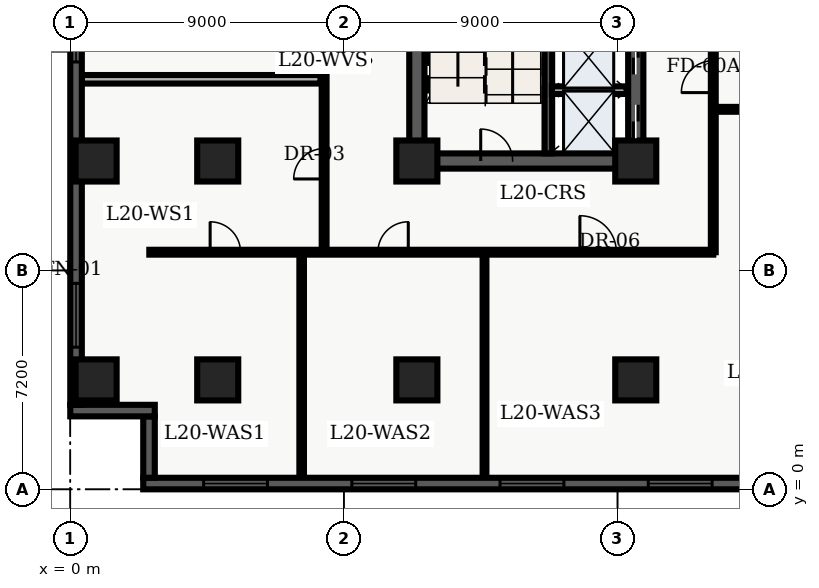
"""IFC4 building model, lengths in metres.
Left out: names, types, materials, properties, quantities, classifications, styles, units other than length and angle.
Written with IfcOpenShell. Run it as: python <this file> out.ifc"""

import sys

from ifc_helpers import new_model, entity, si_unit, converted_unit, direction, frame, origin_with_axes, origin_2d_with_axis, place, context, subcontext, project, spatial, polyline, rectangle, outline, extrude, element, fill, save


model = new_model("IFC4")
c1 = context("Model", 3, precision=1e-05, world=origin_with_axes(), true_north=direction((0.0, 1.0)))
c2 = subcontext(c1, "Body", "Model", "MODEL_VIEW")
j1 = project(units=[si_unit("LENGTHUNIT", "METRE"), converted_unit("PLANEANGLEUNIT", "DEGREE", entity("IfcPlaneAngleMeasure", 0.017), si_unit("PLANEANGLEUNIT", "RADIAN"), dimensions=[0, 0, 0, 0, 0, 0, 0])], contexts=[c1])
p1 = place(None, origin_with_axes())
s1 = spatial("IfcSite", under=j1, at=p1, CompositionType="ELEMENT")
p2 = place(p1, origin_with_axes())
s2 = spatial("IfcBuilding", under=s1, at=p2, CompositionType="ELEMENT")
p3 = place(p2, frame((0.0, 0.0, 84.6), z_axis=(0.0, 0.0, 1.0), x_axis=(1.0, 0.0, 0.0)))
s3 = spatial("IfcBuildingStorey", under=s2, at=p3, CompositionType="ELEMENT", Elevation=84.6)
p4 = place(p3, frame((11.4, 10.8, 0.0), z_axis=(0.0, 0.0, 1.0), x_axis=(0.0, 1.0, 0.0)))
e1 = element("IfcWall", 1, at=p4, inside=s3, PredefinedType="SHEAR", context=c2, shape_type="SweptSolid", body=[
    extrude(outline(polyline([(0.0, -0.25), (27.0, -0.25), (27.0, 0.25), (0.0, 0.25), (0.0, -0.25)])), origin_with_axes(), (0.0, 0.0, 1.0), 4.26),
])
p5 = place(p3, frame((11.4, 10.8, 0.0), z_axis=(0.0, 0.0, 1.0), x_axis=(1.0, 0.0, 0.0)))
e2 = element("IfcWall", 2, at=p5, inside=s3, PredefinedType="SHEAR", context=c2, shape_type="SweptSolid", body=[
    extrude(outline(polyline([(0.0, -0.25), (7.2, -0.25), (7.2, 0.25), (0.0, 0.25), (0.0, -0.25)])), origin_with_axes(), (0.0, 0.0, 1.0), 4.26),
])
p6 = place(p5, frame((2.625, 0.0, 0.0), z_axis=(0.0, 0.0, 1.0), x_axis=(1.0, 0.0, 0.0)))
e3 = element("IfcOpeningElement", 3, at=p6, cuts=e2, PredefinedType="OPENING", context=c2, shape_type="SweptSolid", body=[
    extrude(rectangle(XDim=1.05, YDim=0.52, at=origin_2d_with_axis()), origin_with_axes(), (0.0, 0.0, 1.0), 2.15),
])
p7 = place(p3, frame((18.6, 10.8, 0.0), z_axis=(0.0, 0.0, 1.0), x_axis=(0.0, 1.0, 0.0)))
e4 = element("IfcWall", 4, at=p7, inside=s3, PredefinedType="SHEAR", context=c2, shape_type="SweptSolid", body=[
    extrude(outline(polyline([(0.0, -0.25), (13.5, -0.25), (13.5, 0.25), (0.0, 0.25), (0.0, -0.25)])), origin_with_axes(), (0.0, 0.0, 1.0), 4.26),
])
p8 = place(p7, frame((1.3, 0.0, 0.0), z_axis=(0.0, 0.0, 1.0), x_axis=(1.0, 0.0, 0.0)))
e5 = element("IfcOpeningElement", 5, at=p8, cuts=e4, PredefinedType="OPENING", context=c2, shape_type="SweptSolid", body=[
    extrude(rectangle(XDim=1.1, YDim=0.52, at=origin_2d_with_axis()), origin_with_axes(), (0.0, 0.0, 1.0), 2.15),
])
p9 = place(p7, frame((3.4, 0.0, 0.0), z_axis=(0.0, 0.0, 1.0), x_axis=(1.0, 0.0, 0.0)))
e6 = element("IfcOpeningElement", 6, at=p9, cuts=e4, PredefinedType="OPENING", context=c2, shape_type="SweptSolid", body=[
    extrude(rectangle(XDim=1.1, YDim=0.52, at=origin_2d_with_axis()), origin_with_axes(), (0.0, 0.0, 1.0), 2.15),
])
p10 = place(p7, frame((11.125, 0.0, 0.0), z_axis=(0.0, 0.0, 1.0), x_axis=(1.0, 0.0, 0.0)))
e7 = element("IfcOpeningElement", 7, at=p10, cuts=e4, PredefinedType="OPENING", context=c2, shape_type="SweptSolid", body=[
    extrude(rectangle(XDim=1.05, YDim=0.52, at=origin_2d_with_axis()), origin_with_axes(), (0.0, 0.0, 1.0), 2.15),
])
p11 = place(p3, frame((15.725, 11.05, 0.0), z_axis=(0.0, 0.0, 1.0), x_axis=(0.0, 1.0, 0.0)))
e8 = element("IfcWall", 8, at=p11, inside=s3, PredefinedType="SHEAR", context=c2, shape_type="SweptSolid", body=[
    extrude(outline(polyline([(0.0, -0.125), (8.65, -0.125), (8.65, 0.125), (0.0, 0.125), (0.0, -0.125)])), origin_with_axes(), (0.0, 0.0, 1.0), 4.26),
])
for number, where, z_axis, x_axis in (
    (9, (11.4, 3.6, 0.0), (0.0, 0.0, 1.0), (1.0, 0.0, 0.0)),
    (10, (11.4, 10.8, 0.0), (0.0, 0.0, 1.0), (1.0, 0.0, 0.0)),
    (11, (18.6, 3.6, 0.0), (0.0, 0.0, 1.0), (1.0, 0.0, 0.0)),
    (12, (18.6, 10.8, 0.0), (0.0, 0.0, 1.0), (1.0, 0.0, 0.0)),
    (13, (4.85, 3.6, 0.0), (0.0, 0.0, 1.0), (1.0, 0.0, 0.0)),
    (14, (4.85, 10.8, 0.0), (0.0, 0.0, 1.0), (1.0, 0.0, 0.0)),
    (15, (0.85, 3.6, 0.0), (0.0, 0.0, 1.0), (1.0, 0.0, 0.0)),
    (16, (0.85, 10.8, 0.0), (0.0, 0.0, 1.0), (1.0, 0.0, 0.0)),
):
    element("IfcColumn", number, at=place(p3, frame(where, z_axis=z_axis, x_axis=x_axis)), inside=s3, PredefinedType="COLUMN", context=c2, shape_type="SweptSolid", body=[
        extrude(rectangle(XDim=1.35, YDim=1.35, at=origin_2d_with_axis()), origin_with_axes(), (0.0, 0.0, 1.0), 4.5),
    ])
p12 = place(p3, frame((15.84, 13.13, 0.0), z_axis=(0.0, 0.0, 1.0), x_axis=(1.0, 0.0, 0.0)))
e17 = element("IfcWall", 17, at=p12, inside=s3, PredefinedType="SOLIDWALL", context=c2, shape_type="SweptSolid", body=[
    extrude(outline(polyline([(0.0, -0.125), (2.46, -0.125), (2.46, 0.125), (0.0, 0.125), (0.0, -0.125)])), origin_with_axes(), (0.0, 0.0, 1.0), 3.2),
])
p13 = place(p3, frame((2.6, 7.8, 0.0), z_axis=(0.0, 0.0, 1.0), x_axis=(1.0, 0.0, 0.0)))
e18 = element("IfcWall", 18, at=p13, inside=s3, PredefinedType="PARTITIONING", context=c2, shape_type="SweptSolid", body=[
    extrude(outline(polyline([(0.0, -0.08), (18.55, -0.08), (18.55, 0.08), (0.0, 0.08), (0.0, -0.08)])), origin_with_axes(), (0.0, 0.0, 1.0), 3.2),
])
p14 = place(p13, frame((2.501, 0.0, 0.0), z_axis=(0.0, 0.0, 1.0), x_axis=(1.0, 0.0, 0.0)))
e19 = element("IfcOpeningElement", 19, at=p14, cuts=e18, PredefinedType="OPENING", context=c2, shape_type="SweptSolid", body=[
    extrude(rectangle(XDim=1.0, YDim=0.18, at=origin_2d_with_axis()), origin_with_axes(), (0.0, 0.0, 1.0), 2.15),
])
p15 = place(p13, frame((8.018, 0.0, 0.0), z_axis=(0.0, 0.0, 1.0), x_axis=(1.0, 0.0, 0.0)))
e20 = element("IfcOpeningElement", 20, at=p15, cuts=e18, PredefinedType="OPENING", context=c2, shape_type="SweptSolid", body=[
    extrude(rectangle(XDim=1.0, YDim=0.18, at=origin_2d_with_axis()), origin_with_axes(), (0.0, 0.0, 1.0), 2.15),
])
p16 = place(p13, frame((14.762, 0.0, 0.0), z_axis=(0.0, 0.0, 1.0), x_axis=(1.0, 0.0, 0.0)))
e21 = element("IfcOpeningElement", 21, at=p16, cuts=e18, PredefinedType="OPENING", context=c2, shape_type="SweptSolid", body=[
    extrude(rectangle(XDim=1.2, YDim=0.18, at=origin_2d_with_axis()), origin_with_axes(), (0.0, 0.0, 1.0), 2.2),
])
p17 = place(p3, frame((21.15, 7.8, 0.0), z_axis=(0.0, 0.0, 1.0), x_axis=(0.0, 1.0, 0.0)))
e22 = element("IfcWall", 22, at=p17, inside=s3, PredefinedType="PARTITIONING", context=c2, shape_type="SweptSolid", body=[
    extrude(outline(polyline([(0.0, -0.08), (32.7, -0.08), (32.7, 0.08), (0.0, 0.08), (0.0, -0.08)])), origin_with_axes(), (0.0, 0.0, 1.0), 3.2),
])
p18 = place(p17, frame((5.775, 0.0, 0.0), z_axis=(0.0, 0.0, 1.0), x_axis=(1.0, 0.0, 0.0)))
e23 = element("IfcOpeningElement", 23, at=p18, cuts=e22, PredefinedType="OPENING", context=c2, shape_type="SweptSolid", body=[
    extrude(rectangle(XDim=1.05, YDim=0.18, at=origin_2d_with_axis()), origin_with_axes(), (0.0, 0.0, 1.0), 2.15),
])
p19 = place(p3, frame((8.35, 7.8, 0.0), z_axis=(0.0, 0.0, 1.0), x_axis=(0.0, 1.0, 0.0)))
e24 = element("IfcWall", 24, at=p19, inside=s3, PredefinedType="PARTITIONING", context=c2, shape_type="SweptSolid", body=[
    extrude(outline(polyline([(0.0, -0.08), (12.6, -0.08), (12.6, 0.08), (0.0, 0.08), (0.0, -0.08)])), origin_with_axes(), (0.0, 0.0, 1.0), 3.2),
])
p20 = place(p19, frame((2.909, 0.0, 0.0), z_axis=(0.0, 0.0, 1.0), x_axis=(1.0, 0.0, 0.0)))
e25 = element("IfcOpeningElement", 25, at=p20, cuts=e24, PredefinedType="OPENING", context=c2, shape_type="SweptSolid", body=[
    extrude(rectangle(XDim=1.0, YDim=0.18, at=origin_2d_with_axis()), origin_with_axes(), (0.0, 0.0, 1.0), 2.15),
])
p21 = place(p19, frame((9.104, 0.0, 0.0), z_axis=(0.0, 0.0, 1.0), x_axis=(1.0, 0.0, 0.0)))
e26 = element("IfcOpeningElement", 26, at=p21, cuts=e24, PredefinedType="OPENING", context=c2, shape_type="SweptSolid", body=[
    extrude(rectangle(XDim=1.0, YDim=0.18, at=origin_2d_with_axis()), origin_with_axes(), (0.0, 0.0, 1.0), 2.15),
])
p22 = place(p3, frame((0.375, 13.488, 0.0), z_axis=(0.0, 0.0, 1.0), x_axis=(1.0, 0.0, 0.0)))
e27 = element("IfcWall", 27, at=p22, inside=s3, PredefinedType="PARTITIONING", context=c2, shape_type="SweptSolid", body=[
    extrude(outline(polyline([(0.0, -0.14), (7.855, -0.14), (7.855, 0.14), (0.0, 0.14), (0.0, -0.14)])), origin_with_axes(), (0.0, 0.0, 1.0), 3.2),
])
p23 = place(p3, frame((7.611, 0.36, 0.0), z_axis=(0.0, 0.0, 1.0), x_axis=(0.0, 1.0, 0.0)))
e28 = element("IfcWall", 28, at=p23, inside=s3, PredefinedType="PARTITIONING", context=c2, shape_type="SweptSolid", body=[
    extrude(outline(polyline([(0.0, -0.075), (7.34, -0.075), (7.34, 0.075), (0.0, 0.075), (0.0, -0.075)])), origin_with_axes(), (0.0, 0.0, 1.0), 3.2),
])
p24 = place(p3, frame((13.625, 0.36, 0.0), z_axis=(0.0, 0.0, 1.0), x_axis=(0.0, 1.0, 0.0)))
e29 = element("IfcWall", 29, at=p24, inside=s3, PredefinedType="PARTITIONING", context=c2, shape_type="SweptSolid", body=[
    extrude(outline(polyline([(0.0, -0.062), (7.34, -0.062), (7.34, 0.062), (0.0, 0.062), (0.0, -0.062)])), origin_with_axes(), (0.0, 0.0, 1.0), 3.2),
])
p25 = place(p3, frame((21.15, 12.5, 0.0), z_axis=(0.0, 0.0, 1.0), x_axis=(1.0, 0.0, 0.0)))
e30 = element("IfcWall", 30, at=p25, inside=s3, PredefinedType="PARTITIONING", context=c2, shape_type="SweptSolid", body=[
    extrude(outline(polyline([(0.0, -0.08), (15.2, -0.08), (15.2, 0.08), (0.0, 0.08), (0.0, -0.08)])), origin_with_axes(), (0.0, 0.0, 1.0), 3.2),
])
p26 = place(p25, frame((3.491, 0.0, 0.0), z_axis=(0.0, 0.0, 1.0), x_axis=(1.0, 0.0, 0.0)))
e31 = element("IfcOpeningElement", 31, at=p26, cuts=e30, PredefinedType="OPENING", context=c2, shape_type="SweptSolid", body=[
    extrude(rectangle(XDim=1.0, YDim=0.18, at=origin_2d_with_axis()), origin_with_axes(), (0.0, 0.0, 1.0), 2.15),
])
p27 = place(p25, frame((10.961, 0.0, 0.0), z_axis=(0.0, 0.0, 1.0), x_axis=(1.0, 0.0, 0.0)))
e32 = element("IfcOpeningElement", 32, at=p27, cuts=e30, PredefinedType="OPENING", context=c2, shape_type="SweptSolid", body=[
    extrude(rectangle(XDim=1.0, YDim=0.18, at=origin_2d_with_axis()), origin_with_axes(), (0.0, 0.0, 1.0), 2.15),
])
p28 = place(p3, frame((57.22, 0.19, 0.0), z_axis=(0.0, 0.0, 1.0), x_axis=(-1.0, 0.0, 0.0)))
e33 = element("IfcWall", 33, at=p28, inside=s3, PredefinedType="SOLIDWALL", context=c2, shape_type="SweptSolid", body=[
    extrude(outline(polyline([(0.0, -0.19), (54.82, -0.19), (54.82, 0.19), (0.0, 0.19), (0.0, -0.19)])), origin_with_axes(), (0.0, 0.0, 1.0), 4.26),
])
p29 = place(p28, frame((3.037, 0.0, 0.45), z_axis=(0.0, 0.0, 1.0), x_axis=(1.0, 0.0, 0.0)))
e34 = element("IfcOpeningElement", 34, at=p29, cuts=e33, PredefinedType="OPENING", context=c2, shape_type="SweptSolid", body=[
    extrude(rectangle(XDim=2.1, YDim=0.4, at=origin_2d_with_axis()), origin_with_axes(), (0.0, 0.0, 1.0), 2.2),
])
p30 = place(p28, frame((7.912, 0.0, 0.45), z_axis=(0.0, 0.0, 1.0), x_axis=(1.0, 0.0, 0.0)))
e35 = element("IfcOpeningElement", 35, at=p30, cuts=e33, PredefinedType="OPENING", context=c2, shape_type="SweptSolid", body=[
    extrude(rectangle(XDim=2.1, YDim=0.4, at=origin_2d_with_axis()), origin_with_axes(), (0.0, 0.0, 1.0), 2.2),
])
p31 = place(p28, frame((12.786, 0.0, 0.45), z_axis=(0.0, 0.0, 1.0), x_axis=(1.0, 0.0, 0.0)))
e36 = element("IfcOpeningElement", 36, at=p31, cuts=e33, PredefinedType="OPENING", context=c2, shape_type="SweptSolid", body=[
    extrude(rectangle(XDim=2.1, YDim=0.4, at=origin_2d_with_axis()), origin_with_axes(), (0.0, 0.0, 1.0), 2.2),
])
p32 = place(p28, frame((17.661, 0.0, 0.45), z_axis=(0.0, 0.0, 1.0), x_axis=(1.0, 0.0, 0.0)))
e37 = element("IfcOpeningElement", 37, at=p32, cuts=e33, PredefinedType="OPENING", context=c2, shape_type="SweptSolid", body=[
    extrude(rectangle(XDim=2.1, YDim=0.4, at=origin_2d_with_axis()), origin_with_axes(), (0.0, 0.0, 1.0), 2.2),
])
p33 = place(p28, frame((22.535, 0.0, 0.45), z_axis=(0.0, 0.0, 1.0), x_axis=(1.0, 0.0, 0.0)))
e38 = element("IfcOpeningElement", 38, at=p33, cuts=e33, PredefinedType="OPENING", context=c2, shape_type="SweptSolid", body=[
    extrude(rectangle(XDim=2.1, YDim=0.4, at=origin_2d_with_axis()), origin_with_axes(), (0.0, 0.0, 1.0), 2.2),
])
p34 = place(p28, frame((27.41, 0.0, 0.45), z_axis=(0.0, 0.0, 1.0), x_axis=(1.0, 0.0, 0.0)))
e39 = element("IfcOpeningElement", 39, at=p34, cuts=e33, PredefinedType="OPENING", context=c2, shape_type="SweptSolid", body=[
    extrude(rectangle(XDim=2.1, YDim=0.4, at=origin_2d_with_axis()), origin_with_axes(), (0.0, 0.0, 1.0), 2.2),
])
p35 = place(p28, frame((32.285, 0.0, 0.45), z_axis=(0.0, 0.0, 1.0), x_axis=(1.0, 0.0, 0.0)))
e40 = element("IfcOpeningElement", 40, at=p35, cuts=e33, PredefinedType="OPENING", context=c2, shape_type="SweptSolid", body=[
    extrude(rectangle(XDim=2.1, YDim=0.4, at=origin_2d_with_axis()), origin_with_axes(), (0.0, 0.0, 1.0), 2.2),
])
p36 = place(p28, frame((37.159, 0.0, 0.45), z_axis=(0.0, 0.0, 1.0), x_axis=(1.0, 0.0, 0.0)))
e41 = element("IfcOpeningElement", 41, at=p36, cuts=e33, PredefinedType="OPENING", context=c2, shape_type="SweptSolid", body=[
    extrude(rectangle(XDim=2.1, YDim=0.4, at=origin_2d_with_axis()), origin_with_axes(), (0.0, 0.0, 1.0), 2.2),
])
p37 = place(p28, frame((42.034, 0.0, 0.45), z_axis=(0.0, 0.0, 1.0), x_axis=(1.0, 0.0, 0.0)))
e42 = element("IfcOpeningElement", 42, at=p37, cuts=e33, PredefinedType="OPENING", context=c2, shape_type="SweptSolid", body=[
    extrude(rectangle(XDim=2.1, YDim=0.4, at=origin_2d_with_axis()), origin_with_axes(), (0.0, 0.0, 1.0), 2.2),
])
p38 = place(p28, frame((46.908, 0.0, 0.45), z_axis=(0.0, 0.0, 1.0), x_axis=(1.0, 0.0, 0.0)))
e43 = element("IfcOpeningElement", 43, at=p38, cuts=e33, PredefinedType="OPENING", context=c2, shape_type="SweptSolid", body=[
    extrude(rectangle(XDim=2.1, YDim=0.4, at=origin_2d_with_axis()), origin_with_axes(), (0.0, 0.0, 1.0), 2.2),
])
p39 = place(p28, frame((51.783, 0.0, 0.45), z_axis=(0.0, 0.0, 1.0), x_axis=(1.0, 0.0, 0.0)))
e44 = element("IfcOpeningElement", 44, at=p39, cuts=e33, PredefinedType="OPENING", context=c2, shape_type="SweptSolid", body=[
    extrude(rectangle(XDim=2.1, YDim=0.4, at=origin_2d_with_axis()), origin_with_axes(), (0.0, 0.0, 1.0), 2.2),
])
p40 = place(p3, frame((2.59, 0.38, 0.0), z_axis=(0.0, 0.0, 1.0), x_axis=(0.0, 1.0, 0.0)))
e45 = element("IfcWall", 45, at=p40, inside=s3, PredefinedType="SOLIDWALL", context=c2, shape_type="SweptSolid", body=[
    extrude(outline(polyline([(0.0, -0.19), (2.02, -0.19), (2.02, 0.19), (0.0, 0.19), (0.0, -0.19)])), origin_with_axes(), (0.0, 0.0, 1.0), 4.26),
])
p41 = place(p3, frame((2.78, 2.59, 0.0), z_axis=(0.0, 0.0, 1.0), x_axis=(-1.0, 0.0, 0.0)))
e46 = element("IfcWall", 46, at=p41, inside=s3, PredefinedType="SOLIDWALL", context=c2, shape_type="SweptSolid", body=[
    extrude(outline(polyline([(0.0, -0.19), (2.78, -0.19), (2.78, 0.19), (0.0, 0.19), (0.0, -0.19)])), origin_with_axes(), (0.0, 0.0, 1.0), 4.26),
])
p42 = place(p3, frame((0.19, 2.78, 0.0), z_axis=(0.0, 0.0, 1.0), x_axis=(0.0, 1.0, 0.0)))
e47 = element("IfcWall", 47, at=p42, inside=s3, PredefinedType="SOLIDWALL", context=c2, shape_type="SweptSolid", body=[
    extrude(outline(polyline([(0.0, -0.19), (43.42, -0.19), (43.42, 0.19), (0.0, 0.19), (0.0, -0.19)])), origin_with_axes(), (0.0, 0.0, 1.0), 4.26),
])
p43 = place(p42, frame((2.946, 0.0, 0.45), z_axis=(0.0, 0.0, 1.0), x_axis=(1.0, 0.0, 0.0)))
e48 = element("IfcOpeningElement", 48, at=p43, cuts=e47, PredefinedType="OPENING", context=c2, shape_type="SweptSolid", body=[
    extrude(rectangle(XDim=2.1, YDim=0.4, at=origin_2d_with_axis()), origin_with_axes(), (0.0, 0.0, 1.0), 2.2),
])
p44 = place(p42, frame((12.328, 0.0, 0.45), z_axis=(0.0, 0.0, 1.0), x_axis=(1.0, 0.0, 0.0)))
e49 = element("IfcOpeningElement", 49, at=p44, cuts=e47, PredefinedType="OPENING", context=c2, shape_type="SweptSolid", body=[
    extrude(rectangle(XDim=2.1, YDim=0.4, at=origin_2d_with_axis()), origin_with_axes(), (0.0, 0.0, 1.0), 2.2),
])
p45 = place(p42, frame((26.401, 0.0, 0.45), z_axis=(0.0, 0.0, 1.0), x_axis=(1.0, 0.0, 0.0)))
e50 = element("IfcOpeningElement", 50, at=p45, cuts=e47, PredefinedType="OPENING", context=c2, shape_type="SweptSolid", body=[
    extrude(rectangle(XDim=2.1, YDim=0.4, at=origin_2d_with_axis()), origin_with_axes(), (0.0, 0.0, 1.0), 2.2),
])
p46 = place(p42, frame((31.092, 0.0, 0.45), z_axis=(0.0, 0.0, 1.0), x_axis=(1.0, 0.0, 0.0)))
e51 = element("IfcOpeningElement", 51, at=p46, cuts=e47, PredefinedType="OPENING", context=c2, shape_type="SweptSolid", body=[
    extrude(rectangle(XDim=2.1, YDim=0.4, at=origin_2d_with_axis()), origin_with_axes(), (0.0, 0.0, 1.0), 2.2),
])
p47 = place(p42, frame((40.024, 0.0, 0.45), z_axis=(0.0, 0.0, 1.0), x_axis=(1.0, 0.0, 0.0)))
e52 = element("IfcOpeningElement", 52, at=p47, cuts=e47, PredefinedType="OPENING", context=c2, shape_type="SweptSolid", body=[
    extrude(rectangle(XDim=2.1, YDim=0.4, at=origin_2d_with_axis()), origin_with_axes(), (0.0, 0.0, 1.0), 2.2),
])
p48 = place(p7, frame((1.3, 0.0, 0.0), z_axis=(0.0, 0.0, 1.0), x_axis=(1.0, 0.0, 0.0)))
e53 = element("IfcDoor", 53, at=p48, inside=s3, OperationType="SLIDING_TO_LEFT", PredefinedType="DOOR", context=c2, shape_type="SweptSolid", body=[
    extrude(rectangle(XDim=1.1, YDim=0.09, at=origin_2d_with_axis()), origin_with_axes(), (0.0, 0.0, 1.0), 2.15),
])
fill(e5, e53)
p49 = place(p7, frame((3.4, 0.0, 0.0), z_axis=(0.0, 0.0, 1.0), x_axis=(1.0, 0.0, 0.0)))
e54 = element("IfcDoor", 54, at=p49, inside=s3, OperationType="SLIDING_TO_RIGHT", PredefinedType="DOOR", context=c2, shape_type="SweptSolid", body=[
    extrude(rectangle(XDim=1.1, YDim=0.09, at=origin_2d_with_axis()), origin_with_axes(), (0.0, 0.0, 1.0), 2.15),
])
fill(e6, e54)
p50 = place(p5, frame((2.625, 0.0, 0.0), z_axis=(0.0, 0.0, 1.0), x_axis=(1.0, 0.0, 0.0)))
e55 = element("IfcDoor", 55, at=p50, inside=s3, OperationType="SINGLE_SWING_LEFT", PredefinedType="DOOR", context=c2, shape_type="SweptSolid", body=[
    extrude(rectangle(XDim=1.05, YDim=0.09, at=origin_2d_with_axis()), origin_with_axes(), (0.0, 0.0, 1.0), 2.15),
])
fill(e3, e55)
p51 = place(p19, frame((2.909, 0.0, 0.0), z_axis=(0.0, 0.0, 1.0), x_axis=(1.0, 0.0, 0.0)))
e56 = element("IfcDoor", 56, at=p51, inside=s3, OperationType="SINGLE_SWING_LEFT", PredefinedType="DOOR", context=c2, shape_type="SweptSolid", body=[
    extrude(rectangle(XDim=1.0, YDim=0.09, at=origin_2d_with_axis()), origin_with_axes(), (0.0, 0.0, 1.0), 2.15),
])
fill(e25, e56)
p52 = place(p13, frame((2.501, 0.0, 0.0), z_axis=(0.0, 0.0, 1.0), x_axis=(1.0, 0.0, 0.0)))
e57 = element("IfcDoor", 57, at=p52, inside=s3, OperationType="SINGLE_SWING_LEFT", PredefinedType="DOOR", context=c2, shape_type="SweptSolid", body=[
    extrude(rectangle(XDim=1.0, YDim=0.09, at=origin_2d_with_axis()), origin_with_axes(), (0.0, 0.0, 1.0), 2.15),
])
fill(e19, e57)
p53 = place(p13, frame((8.018, 0.0, 0.0), z_axis=(0.0, 0.0, 1.0), x_axis=(1.0, 0.0, 0.0)))
e58 = element("IfcDoor", 58, at=p53, inside=s3, OperationType="SINGLE_SWING_RIGHT", PredefinedType="DOOR", context=c2, shape_type="SweptSolid", body=[
    extrude(rectangle(XDim=1.0, YDim=0.09, at=origin_2d_with_axis()), origin_with_axes(), (0.0, 0.0, 1.0), 2.15),
])
fill(e20, e58)
p54 = place(p13, frame((14.762, 0.0, 0.0), z_axis=(0.0, 0.0, 1.0), x_axis=(1.0, 0.0, 0.0)))
e59 = element("IfcDoor", 59, at=p54, inside=s3, OperationType="SINGLE_SWING_LEFT", PredefinedType="DOOR", context=c2, shape_type="SweptSolid", body=[
    extrude(rectangle(XDim=1.2, YDim=0.09, at=origin_2d_with_axis()), origin_with_axes(), (0.0, 0.0, 1.0), 2.2),
])
fill(e21, e59)
p55 = place(p17, frame((5.775, 0.0, 0.0), z_axis=(0.0, 0.0, 1.0), x_axis=(1.0, 0.0, 0.0)))
e60 = element("IfcDoor", 60, at=p55, inside=s3, OperationType="SINGLE_SWING_LEFT", PredefinedType="DOOR", context=c2, shape_type="SweptSolid", body=[
    extrude(rectangle(XDim=1.05, YDim=0.09, at=origin_2d_with_axis()), origin_with_axes(), (0.0, 0.0, 1.0), 2.15),
])
fill(e23, e60)
p56 = place(p28, frame((37.159, 0.0, 0.45), z_axis=(0.0, 0.0, 1.0), x_axis=(1.0, 0.0, 0.0)))
e61 = element("IfcWindow", 61, at=p56, inside=s3, PredefinedType="WINDOW", context=c2, shape_type="SweptSolid", body=[
    extrude(rectangle(XDim=2.1, YDim=0.09, at=origin_2d_with_axis()), origin_with_axes(), (0.0, 0.0, 1.0), 2.2),
])
fill(e41, e61)
p57 = place(p28, frame((42.034, 0.0, 0.45), z_axis=(0.0, 0.0, 1.0), x_axis=(1.0, 0.0, 0.0)))
e62 = element("IfcWindow", 62, at=p57, inside=s3, PredefinedType="WINDOW", context=c2, shape_type="SweptSolid", body=[
    extrude(rectangle(XDim=2.1, YDim=0.09, at=origin_2d_with_axis()), origin_with_axes(), (0.0, 0.0, 1.0), 2.2),
])
fill(e42, e62)
p58 = place(p28, frame((46.908, 0.0, 0.45), z_axis=(0.0, 0.0, 1.0), x_axis=(1.0, 0.0, 0.0)))
e63 = element("IfcWindow", 63, at=p58, inside=s3, PredefinedType="WINDOW", context=c2, shape_type="SweptSolid", body=[
    extrude(rectangle(XDim=2.1, YDim=0.09, at=origin_2d_with_axis()), origin_with_axes(), (0.0, 0.0, 1.0), 2.2),
])
fill(e43, e63)
p59 = place(p28, frame((51.783, 0.0, 0.45), z_axis=(0.0, 0.0, 1.0), x_axis=(1.0, 0.0, 0.0)))
e64 = element("IfcWindow", 64, at=p59, inside=s3, PredefinedType="WINDOW", context=c2, shape_type="SweptSolid", body=[
    extrude(rectangle(XDim=2.1, YDim=0.09, at=origin_2d_with_axis()), origin_with_axes(), (0.0, 0.0, 1.0), 2.2),
])
fill(e44, e64)
p60 = place(p42, frame((2.946, 0.0, 0.45), z_axis=(0.0, 0.0, 1.0), x_axis=(1.0, 0.0, 0.0)))
e65 = element("IfcWindow", 65, at=p60, inside=s3, PredefinedType="WINDOW", context=c2, shape_type="SweptSolid", body=[
    extrude(rectangle(XDim=2.1, YDim=0.09, at=origin_2d_with_axis()), origin_with_axes(), (0.0, 0.0, 1.0), 2.2),
])
fill(e48, e65)
p61 = place(p42, frame((12.328, 0.0, 0.45), z_axis=(0.0, 0.0, 1.0), x_axis=(1.0, 0.0, 0.0)))
e66 = element("IfcWindow", 66, at=p61, inside=s3, PredefinedType="WINDOW", context=c2, shape_type="SweptSolid", body=[
    extrude(rectangle(XDim=2.1, YDim=0.09, at=origin_2d_with_axis()), origin_with_axes(), (0.0, 0.0, 1.0), 2.2),
])
fill(e49, e66)
save(model, sys.argv[1])
